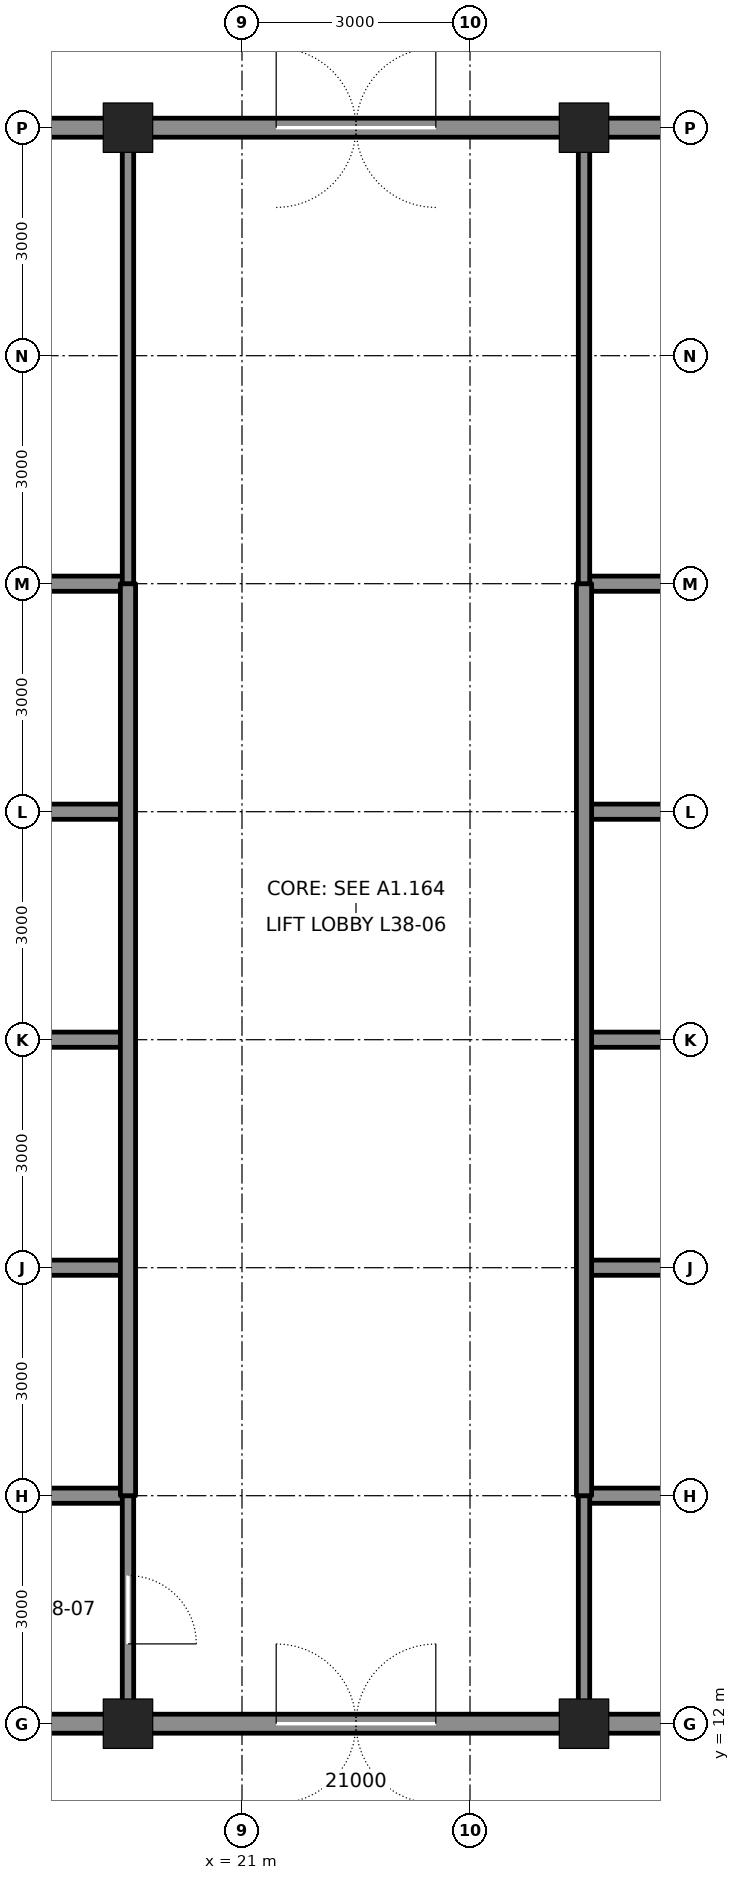
"""IFC4 building model, lengths in metres.
Left out: names, types, materials, properties, quantities, classifications, styles, units other than length and angle.
Written with IfcOpenShell. Run it as: python <this file> out.ifc"""

import sys

from ifc_helpers import new_model, si_unit, direction, frame, frame_2d, origin, origin_2d, place, context, subcontext, project, spatial, rectangle, hollow_rectangle, extrude, element, fill, save


model = new_model("IFC4")
c1 = context("Model", 3, precision=1e-05, world=origin(), true_north=direction((0.0, 1.0)))
c2 = subcontext(c1, "Body", "Model", "MODEL_VIEW")
j1 = project(units=[si_unit("LENGTHUNIT", "METRE"), si_unit("PLANEANGLEUNIT", "RADIAN")], contexts=[c1])
p1 = place(None, origin())
s1 = spatial("IfcSite", under=j1, at=p1, CompositionType="ELEMENT")
p2 = place(p1, origin())
s2 = spatial("IfcBuilding", under=s1, at=p2, CompositionType="ELEMENT")
p3 = place(p2, frame((0.0, 0.0, 174.0)))
s3 = spatial("IfcBuildingStorey", under=s2, at=p3, CompositionType="ELEMENT", Elevation=174.0)
for number, where, z_axis, x_axis in (
    (1, (19.5, 12.0, 0.0), (0.0, 0.0, 1.0), (1.0, 0.0, 0.0)),
    (2, (25.5, 12.0, 0.0), (0.0, 0.0, 1.0), (1.0, 0.0, 0.0)),
    (3, (19.5, 33.0, 0.0), (0.0, 0.0, 1.0), (1.0, 0.0, 0.0)),
    (4, (25.5, 33.0, 0.0), (0.0, 0.0, 1.0), (1.0, 0.0, 0.0)),
):
    element("IfcColumn", number, at=place(p3, frame(where, z_axis=z_axis, x_axis=x_axis)), inside=s3, PredefinedType="COLUMN", context=c2, shape_type="SweptSolid", body=[
        extrude(hollow_rectangle(XDim=0.65, YDim=0.65, WallThickness=0.065, at=origin_2d()), origin(), (0.0, 0.0, 1.0), 6.0),
    ])
for number, where, z_axis, x_axis in (
    (5, (16.75, 12.0, 0.0), (0.0, 0.0, 1.0), (1.0, 0.0, 0.0)),
    (6, (25.75, 12.0, 0.0), (0.0, 0.0, 1.0), (1.0, 0.0, 0.0)),
):
    element("IfcWall", number, at=place(p3, frame(where, z_axis=z_axis, x_axis=x_axis)), inside=s3, PredefinedType="SOLIDWALL", context=c2, shape_type="SweptSolid", body=[
        extrude(rectangle(XDim=2.5, YDim=0.25, at=frame_2d((1.25, 0.0))), origin(), (0.0, 0.0, 1.0), 4.981),
    ])
for number, where, z_axis, x_axis in (
    (7, (12.0, 15.0, 0.0), (0.0, 0.0, 1.0), (1.0, 0.0, 0.0)),
    (8, (25.5, 15.0, 0.0), (0.0, 0.0, 1.0), (1.0, 0.0, 0.0)),
):
    element("IfcWall", number, at=place(p3, frame(where, z_axis=z_axis, x_axis=x_axis)), inside=s3, PredefinedType="SOLIDWALL", context=c2, shape_type="SweptSolid", body=[
        extrude(rectangle(XDim=7.5, YDim=0.2, at=frame_2d((3.75, 0.0))), origin(), (0.0, 0.0, 1.0), 5.84),
    ])
for number, where, z_axis, x_axis in (
    (9, (16.75, 24.0, 0.0), (0.0, 0.0, 1.0), (1.0, 0.0, 0.0)),
    (10, (25.5, 24.0, 0.0), (0.0, 0.0, 1.0), (1.0, 0.0, 0.0)),
):
    element("IfcWall", number, at=place(p3, frame(where, z_axis=z_axis, x_axis=x_axis)), inside=s3, PredefinedType="SOLIDWALL", context=c2, shape_type="SweptSolid", body=[
        extrude(rectangle(XDim=2.75, YDim=0.2, at=frame_2d((1.375, 0.0))), origin(), (0.0, 0.0, 1.0), 4.89),
    ])
p4 = place(p3, frame((12.0, 27.0, 0.0), z_axis=(0.0, 0.0, 1.0), x_axis=(1.0, 0.0, 0.0)))
e11 = element("IfcWall", 11, at=p4, inside=s3, PredefinedType="SOLIDWALL", context=c2, shape_type="SweptSolid", body=[
    extrude(rectangle(XDim=7.5, YDim=0.2, at=frame_2d((3.75, 0.0))), origin(), (0.0, 0.0, 1.0), 5.84),
])
p5 = place(p4, frame((1.65, 0.0, 0.0)))
e12 = element("IfcOpeningElement", 12, at=p5, cuts=e11, PredefinedType="OPENING", context=c2, shape_type="SweptSolid", body=[
    extrude(rectangle(XDim=1.2, YDim=2.1, at=frame_2d((0.6, 1.05))), frame((0.0, 0.11, 0.0), z_axis=(0.0, -1.0, 0.0), x_axis=(1.0, 0.0, 0.0)), (0.0, 0.0, 1.0), 0.22),
])
p6 = place(p3, frame((25.5, 27.0, 0.0), z_axis=(0.0, 0.0, 1.0), x_axis=(1.0, 0.0, 0.0)))
e13 = element("IfcWall", 13, at=p6, inside=s3, PredefinedType="SOLIDWALL", context=c2, shape_type="SweptSolid", body=[
    extrude(rectangle(XDim=3.0, YDim=0.2, at=frame_2d((1.5, 0.0))), origin(), (0.0, 0.0, 1.0), 5.84),
])
for number, where, z_axis, x_axis in (
    (14, (16.75, 33.0, 0.0), (0.0, 0.0, 1.0), (1.0, 0.0, 0.0)),
    (15, (25.75, 33.0, 0.0), (0.0, 0.0, 1.0), (1.0, 0.0, 0.0)),
):
    element("IfcWall", number, at=place(p3, frame(where, z_axis=z_axis, x_axis=x_axis)), inside=s3, PredefinedType="SOLIDWALL", context=c2, shape_type="SweptSolid", body=[
        extrude(rectangle(XDim=2.5, YDim=0.25, at=frame_2d((1.25, 0.0))), origin(), (0.0, 0.0, 1.0), 4.981),
    ])
p7 = place(p3, frame((16.5, 18.0, 0.0), z_axis=(0.0, 0.0, 1.0), x_axis=(1.0, 0.0, 0.0)))
e16 = element("IfcWall", 16, at=p7, inside=s3, PredefinedType="SOLIDWALL", context=c2, shape_type="SweptSolid", body=[
    extrude(rectangle(XDim=3.0, YDim=0.2, at=frame_2d((1.5, 0.0))), origin(), (0.0, 0.0, 1.0), 5.84),
])
p8 = place(p3, frame((25.5, 18.0, 0.0), z_axis=(0.0, 0.0, 1.0), x_axis=(1.0, 0.0, 0.0)))
e17 = element("IfcWall", 17, at=p8, inside=s3, PredefinedType="SOLIDWALL", context=c2, shape_type="SweptSolid", body=[
    extrude(rectangle(XDim=7.5, YDim=0.2, at=frame_2d((3.75, 0.0))), origin(), (0.0, 0.0, 1.0), 5.84),
])
p9 = place(p8, frame((4.65, 0.0, 0.0)))
e18 = element("IfcOpeningElement", 18, at=p9, cuts=e17, PredefinedType="OPENING", context=c2, shape_type="SweptSolid", body=[
    extrude(rectangle(XDim=1.2, YDim=2.1, at=frame_2d((0.6, 1.05))), frame((0.0, 0.11, 0.0), z_axis=(0.0, -1.0, 0.0), x_axis=(1.0, 0.0, 0.0)), (0.0, 0.0, 1.0), 0.22),
])
for number, where, z_axis, x_axis in (
    (19, (16.75, 21.0, 0.0), (0.0, 0.0, 1.0), (1.0, 0.0, 0.0)),
    (20, (25.5, 21.0, 0.0), (0.0, 0.0, 1.0), (1.0, 0.0, 0.0)),
):
    element("IfcWall", number, at=place(p3, frame(where, z_axis=z_axis, x_axis=x_axis)), inside=s3, PredefinedType="SOLIDWALL", context=c2, shape_type="SweptSolid", body=[
        extrude(rectangle(XDim=2.75, YDim=0.2, at=frame_2d((1.375, 0.0))), origin(), (0.0, 0.0, 1.0), 4.89),
    ])
p10 = place(p3, frame((19.5, 12.25, 0.0), z_axis=(0.0, 0.0, 1.0), x_axis=(0.0, 1.0, 0.0)))
e21 = element("IfcWall", 21, at=p10, inside=s3, PredefinedType="PARTITIONING", context=c2, shape_type="SweptSolid", body=[
    extrude(rectangle(XDim=2.75, YDim=0.15, at=frame_2d((1.375, 0.0))), origin(), (0.0, 0.0, 1.0), 4.865),
])
p11 = place(p10, frame((0.8, 0.0, 0.0)))
e22 = element("IfcOpeningElement", 22, at=p11, cuts=e21, PredefinedType="OPENING", context=c2, shape_type="SweptSolid", body=[
    extrude(rectangle(XDim=0.9, YDim=2.1, at=frame_2d((0.45, 1.05))), frame((0.0, 0.085, 0.0), z_axis=(0.0, -1.0, 0.0), x_axis=(1.0, 0.0, 0.0)), (0.0, 0.0, 1.0), 0.17),
])
p12 = place(p3, frame((19.5, 15.0, 0.0), z_axis=(0.0, 0.0, 1.0), x_axis=(0.0, 1.0, 0.0)))
e23 = element("IfcWall", 23, at=p12, inside=s3, PredefinedType="SOLIDWALL", context=c2, shape_type="SweptSolid", body=[
    extrude(rectangle(XDim=12.0, YDim=0.2, at=frame_2d((6.0, 0.0))), origin(), (0.0, 0.0, 1.0), 4.865),
])
p13 = place(p3, frame((19.5, 27.0, 0.0), z_axis=(0.0, 0.0, 1.0), x_axis=(0.0, 1.0, 0.0)))
e24 = element("IfcWall", 24, at=p13, inside=s3, PredefinedType="PARTITIONING", context=c2, shape_type="SweptSolid", body=[
    extrude(rectangle(XDim=5.75, YDim=0.15, at=frame_2d((2.875, 0.0))), origin(), (0.0, 0.0, 1.0), 4.865),
])
p14 = place(p3, frame((25.5, 12.25, 0.0), z_axis=(0.0, 0.0, 1.0), x_axis=(0.0, 1.0, 0.0)))
e25 = element("IfcWall", 25, at=p14, inside=s3, PredefinedType="PARTITIONING", context=c2, shape_type="SweptSolid", body=[
    extrude(rectangle(XDim=2.75, YDim=0.15, at=frame_2d((1.375, 0.0))), origin(), (0.0, 0.0, 1.0), 4.865),
])
p15 = place(p3, frame((25.5, 15.0, 0.0), z_axis=(0.0, 0.0, 1.0), x_axis=(0.0, 1.0, 0.0)))
e26 = element("IfcWall", 26, at=p15, inside=s3, PredefinedType="SOLIDWALL", context=c2, shape_type="SweptSolid", body=[
    extrude(rectangle(XDim=12.0, YDim=0.2, at=frame_2d((6.0, 0.0))), origin(), (0.0, 0.0, 1.0), 4.865),
])
p16 = place(p3, frame((25.5, 27.0, 0.0), z_axis=(0.0, 0.0, 1.0), x_axis=(0.0, 1.0, 0.0)))
e27 = element("IfcWall", 27, at=p16, inside=s3, PredefinedType="PARTITIONING", context=c2, shape_type="SweptSolid", body=[
    extrude(rectangle(XDim=5.75, YDim=0.15, at=frame_2d((2.875, 0.0))), origin(), (0.0, 0.0, 1.0), 4.865),
])
p17 = place(p3, frame((19.5, 12.0, 0.0), z_axis=(0.0, 0.0, 1.0), x_axis=(1.0, 0.0, 0.0)))
e28 = element("IfcWall", 28, at=p17, inside=s3, PredefinedType="SOLIDWALL", context=c2, shape_type="SweptSolid", body=[
    extrude(rectangle(XDim=6.0, YDim=0.25, at=frame_2d((3.0, 0.0))), origin(), (0.0, 0.0, 1.0), 4.981),
])
p18 = place(p17, frame((1.95, 0.0, 0.0)))
e29 = element("IfcOpeningElement", 29, at=p18, cuts=e28, PredefinedType="OPENING", context=c2, shape_type="SweptSolid", body=[
    extrude(rectangle(XDim=2.1, YDim=2.4, at=frame_2d((1.05, 1.2))), frame((0.0, 0.135, 0.0), z_axis=(0.0, -1.0, 0.0), x_axis=(1.0, 0.0, 0.0)), (0.0, 0.0, 1.0), 0.27),
])
p19 = place(p3, frame((19.5, 33.0, 0.0), z_axis=(0.0, 0.0, 1.0), x_axis=(1.0, 0.0, 0.0)))
e30 = element("IfcWall", 30, at=p19, inside=s3, PredefinedType="SOLIDWALL", context=c2, shape_type="SweptSolid", body=[
    extrude(rectangle(XDim=6.0, YDim=0.25, at=frame_2d((3.0, 0.0))), origin(), (0.0, 0.0, 1.0), 4.981),
])
p20 = place(p19, frame((1.95, 0.0, 0.0)))
e31 = element("IfcOpeningElement", 31, at=p20, cuts=e30, PredefinedType="OPENING", context=c2, shape_type="SweptSolid", body=[
    extrude(rectangle(XDim=2.1, YDim=2.4, at=frame_2d((1.05, 1.2))), frame((0.0, 0.135, 0.0), z_axis=(0.0, -1.0, 0.0), x_axis=(1.0, 0.0, 0.0)), (0.0, 0.0, 1.0), 0.27),
])
p21 = place(p18, origin())
e32 = element("IfcDoor", 32, at=p21, inside=s3, OperationType="DOUBLE_DOOR_DOUBLE_SWING", PredefinedType="DOOR", context=c2, shape_type="SweptSolid", body=[
    extrude(rectangle(XDim=2.1, YDim=2.4, at=frame_2d((1.05, 1.2))), frame((0.0, 0.025, 0.0), z_axis=(0.0, -1.0, 0.0), x_axis=(1.0, 0.0, 0.0)), (0.0, 0.0, 1.0), 0.05),
])
fill(e29, e32)
p22 = place(p20, origin())
e33 = element("IfcDoor", 33, at=p22, inside=s3, OperationType="DOUBLE_DOOR_DOUBLE_SWING", PredefinedType="DOOR", context=c2, shape_type="SweptSolid", body=[
    extrude(rectangle(XDim=2.1, YDim=2.4, at=frame_2d((1.05, 1.2))), frame((0.0, 0.025, 0.0), z_axis=(0.0, -1.0, 0.0), x_axis=(1.0, 0.0, 0.0)), (0.0, 0.0, 1.0), 0.05),
])
fill(e31, e33)
p23 = place(p11, frame((0.9, 0.0, 0.0), z_axis=(0.0, 0.0, 1.0), x_axis=(-1.0, 0.0, 0.0)))
e34 = element("IfcDoor", 34, at=p23, inside=s3, OperationType="SINGLE_SWING_RIGHT", PredefinedType="DOOR", context=c2, shape_type="SweptSolid", body=[
    extrude(rectangle(XDim=0.9, YDim=2.1, at=frame_2d((0.45, 1.05))), frame((0.0, 0.025, 0.0), z_axis=(0.0, -1.0, 0.0), x_axis=(1.0, 0.0, 0.0)), (0.0, 0.0, 1.0), 0.05),
])
fill(e22, e34)
save(model, sys.argv[1])
